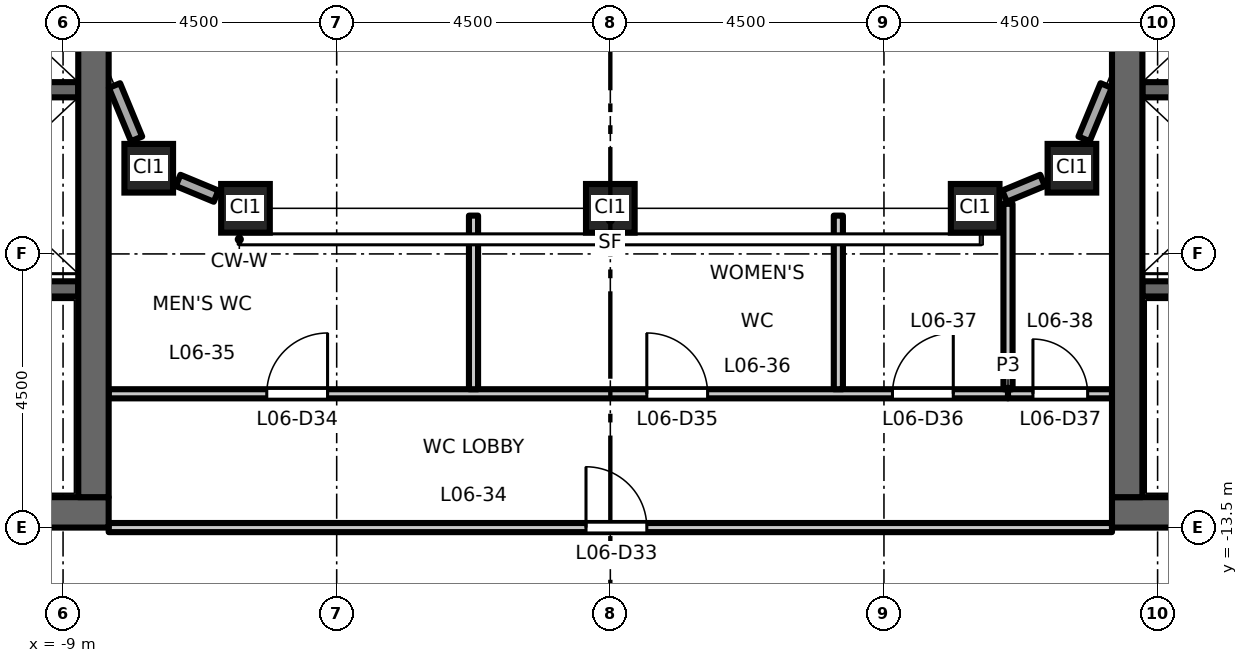
"""IFC4 building model, lengths in metres.
Left out: names, types, materials, properties, quantities, classifications, styles, units other than length and angle.
Written with IfcOpenShell. Run it as: python <this file> out.ifc"""

import sys

from ifc_helpers import new_model, si_unit, direction, frame, frame_2d, origin, origin_2d, place, context, subcontext, project, spatial, rectangle, hollow_rectangle, extrude, element, fill, save


model = new_model("IFC4")
c1 = context("Model", 3, precision=1e-05, world=origin(), true_north=direction((0.0, 1.0)))
c2 = subcontext(c1, "Body", "Model", "MODEL_VIEW")
j1 = project(units=[si_unit("LENGTHUNIT", "METRE"), si_unit("PLANEANGLEUNIT", "RADIAN")], contexts=[c1])
p1 = place(None, origin())
s1 = spatial("IfcSite", under=j1, at=p1, CompositionType="ELEMENT")
p2 = place(p1, origin())
s2 = spatial("IfcBuilding", under=s1, at=p2, CompositionType="ELEMENT")
p3 = place(p2, frame((0.0, 0.0, 31.2)))
s3 = spatial("IfcBuildingStorey", under=s2, at=p3, CompositionType="ELEMENT", Elevation=31.2)
for number, where, z_axis, x_axis in (
    (1, (-7.591, -7.591, 0.0), (0.0, 0.0, 1.0), (1.0, 0.0, 0.0)),
    (2, (-6.0, -8.25, 0.0), (0.0, 0.0, 1.0), (1.0, 0.0, 0.0)),
    (3, (0.0, -8.25, 0.0), (0.0, 0.0, 1.0), (1.0, 0.0, 0.0)),
    (4, (6.0, -8.25, 0.0), (0.0, 0.0, 1.0), (1.0, 0.0, 0.0)),
    (5, (7.591, -7.591, 0.0), (0.0, 0.0, 1.0), (1.0, 0.0, 0.0)),
):
    element("IfcColumn", number, at=place(p3, frame(where, z_axis=z_axis, x_axis=x_axis)), inside=s3, PredefinedType="COLUMN", context=c2, shape_type="SweptSolid", body=[
        extrude(hollow_rectangle(XDim=0.8, YDim=0.8, WallThickness=0.05, at=origin_2d()), origin(), (0.0, 0.0, 1.0), 4.5),
    ])
p4 = place(p3, frame((-8.75, -6.3, 0.0), z_axis=(0.0, 0.0, 1.0), x_axis=(-1.0, 0.0, 0.0)))
e6 = element("IfcWall", 6, at=p4, inside=s3, PredefinedType="SHEAR", context=c2, shape_type="SweptSolid", body=[
    extrude(rectangle(XDim=3.1, YDim=0.25, at=frame_2d((1.55, 0.0))), origin(), (0.0, 0.0, 1.0), 4.35),
])
p5 = place(p3, frame((-8.75, -9.575, 0.0), z_axis=(0.0, 0.0, 1.0), x_axis=(-1.0, 0.0, 0.0)))
e7 = element("IfcWall", 7, at=p5, inside=s3, PredefinedType="SHEAR", context=c2, shape_type="SweptSolid", body=[
    extrude(rectangle(XDim=8.0, YDim=0.25, at=frame_2d((4.0, 0.0))), origin(), (0.0, 0.0, 1.0), 4.35),
])
p6 = place(p5, frame((6.65, 0.0, 0.0)))
e8 = element("IfcOpeningElement", 8, at=p6, cuts=e7, PredefinedType="OPENING", context=c2, shape_type="SweptSolid", body=[
    extrude(rectangle(XDim=1.1, YDim=2.1, at=frame_2d((0.55, 1.05))), frame((0.0, 0.135, 0.0), z_axis=(0.0, -1.0, 0.0), x_axis=(1.0, 0.0, 0.0)), (0.0, 0.0, 1.0), 0.27),
])
p7 = place(p3, frame((-8.25, -13.25, 0.0), z_axis=(0.0, 0.0, 1.0), x_axis=(-1.0, 0.0, 0.0)))
e9 = element("IfcWall", 9, at=p7, inside=s3, PredefinedType="SHEAR", context=c2, shape_type="SweptSolid", body=[
    extrude(rectangle(XDim=13.5, YDim=0.5, at=frame_2d((6.75, 0.0))), origin(), (0.0, 0.0, 1.0), 4.35),
])
p8 = place(p3, frame((-8.5, -13.0, 0.0), z_axis=(0.0, 0.0, 1.0), x_axis=(0.0, 1.0, 0.0)))
e10 = element("IfcWall", 10, at=p8, inside=s3, PredefinedType="SHEAR", context=c2, shape_type="SweptSolid", body=[
    extrude(rectangle(XDim=26.0, YDim=0.5, at=frame_2d((13.0, 0.0))), origin(), (0.0, 0.0, 1.0), 4.35),
])
p9 = place(p3, frame((8.75, -6.3, 0.0), z_axis=(0.0, 0.0, 1.0), x_axis=(1.0, 0.0, 0.0)))
e11 = element("IfcWall", 11, at=p9, inside=s3, PredefinedType="SHEAR", context=c2, shape_type="SweptSolid", body=[
    extrude(rectangle(XDim=3.1, YDim=0.25, at=frame_2d((1.55, 0.0))), origin(), (0.0, 0.0, 1.0), 4.35),
])
p10 = place(p3, frame((8.75, -9.575, 0.0), z_axis=(0.0, 0.0, 1.0), x_axis=(1.0, 0.0, 0.0)))
e12 = element("IfcWall", 12, at=p10, inside=s3, PredefinedType="SHEAR", context=c2, shape_type="SweptSolid", body=[
    extrude(rectangle(XDim=8.0, YDim=0.25, at=frame_2d((4.0, 0.0))), origin(), (0.0, 0.0, 1.0), 4.35),
])
p11 = place(p10, frame((6.65, 0.0, 0.0)))
e13 = element("IfcOpeningElement", 13, at=p11, cuts=e12, PredefinedType="OPENING", context=c2, shape_type="SweptSolid", body=[
    extrude(rectangle(XDim=1.1, YDim=2.1, at=frame_2d((0.55, 1.05))), frame((0.0, 0.135, 0.0), z_axis=(0.0, -1.0, 0.0), x_axis=(1.0, 0.0, 0.0)), (0.0, 0.0, 1.0), 0.27),
])
p12 = place(p3, frame((8.25, -13.25, 0.0), z_axis=(0.0, 0.0, 1.0), x_axis=(1.0, 0.0, 0.0)))
e14 = element("IfcWall", 14, at=p12, inside=s3, PredefinedType="SHEAR", context=c2, shape_type="SweptSolid", body=[
    extrude(rectangle(XDim=13.5, YDim=0.5, at=frame_2d((6.75, 0.0))), origin(), (0.0, 0.0, 1.0), 4.35),
])
p13 = place(p3, frame((8.5, -13.0, 0.0), z_axis=(0.0, 0.0, 1.0), x_axis=(0.0, 1.0, 0.0)))
e15 = element("IfcWall", 15, at=p13, inside=s3, PredefinedType="SHEAR", context=c2, shape_type="SweptSolid", body=[
    extrude(rectangle(XDim=26.0, YDim=0.5, at=frame_2d((13.0, 0.0))), origin(), (0.0, 0.0, 1.0), 4.35),
])
p14 = place(p3, frame((6.483, -8.05, 0.0), z_axis=(0.0, 0.0, 1.0), x_axis=(0.923854141361, 0.382744726273, 0.0)))
e16 = element("IfcWall", 16, at=p14, inside=s3, PredefinedType="STANDARD", context=c2, shape_type="SweptSolid", body=[
    extrude(rectangle(XDim=0.677, YDim=0.2, at=frame_2d((0.338, 0.0))), origin(), (0.0, 0.0, 1.0), 3.73),
])
for number, where, z_axis, x_axis in (
    (17, (7.791, -7.108, 0.0), (0.0, 0.0, 1.0), (0.383, 0.924, 0.0)),
    (18, (-8.154, -6.231, 0.0), (0.0, 0.0, 1.0), (0.383, -0.924, 0.0)),
):
    element("IfcWall", number, at=place(p3, frame(where, z_axis=z_axis, x_axis=x_axis)), inside=s3, PredefinedType="STANDARD", context=c2, shape_type="SweptSolid", body=[
        extrude(rectangle(XDim=0.949, YDim=0.2, at=frame_2d((0.475, 0.0))), origin(), (0.0, 0.0, 1.0), 3.73),
    ])
p15 = place(p3, frame((-7.108, -7.791, 0.0), z_axis=(0.0, 0.0, 1.0), x_axis=(0.923854141361, -0.382744726273, 0.0)))
e19 = element("IfcWall", 19, at=p15, inside=s3, PredefinedType="STANDARD", context=c2, shape_type="SweptSolid", body=[
    extrude(rectangle(XDim=0.677, YDim=0.2, at=frame_2d((0.338, 0.0))), origin(), (0.0, 0.0, 1.0), 3.73),
])
p16 = place(p3, frame((-8.25, -13.5, 0.0), z_axis=(0.0, 0.0, 1.0), x_axis=(1.0, 0.0, 0.0)))
e20 = element("IfcWall", 20, at=p16, inside=s3, PredefinedType="PARTITIONING", context=c2, shape_type="SweptSolid", body=[
    extrude(rectangle(XDim=16.5, YDim=0.15, at=frame_2d((8.25, 0.0))), origin(), (0.0, 0.0, 1.0), 3.85),
])
p17 = place(p16, frame((7.85, 0.0, 0.0)))
e21 = element("IfcOpeningElement", 21, at=p17, cuts=e20, PredefinedType="OPENING", context=c2, shape_type="SweptSolid", body=[
    extrude(rectangle(XDim=1.0, YDim=2.1, at=frame_2d((0.5, 1.05))), frame((0.0, 0.085, 0.0), z_axis=(0.0, -1.0, 0.0), x_axis=(1.0, 0.0, 0.0)), (0.0, 0.0, 1.0), 0.17),
])
p18 = place(p3, frame((-8.25, -11.3, 0.0), z_axis=(0.0, 0.0, 1.0), x_axis=(1.0, 0.0, 0.0)))
e22 = element("IfcWall", 22, at=p18, inside=s3, PredefinedType="PARTITIONING", context=c2, shape_type="SweptSolid", body=[
    extrude(rectangle(XDim=14.79, YDim=0.15, at=frame_2d((7.395, 0.0))), origin(), (0.0, 0.0, 1.0), 4.35),
])
p19 = place(p18, frame((2.6, 0.0, 0.0)))
e23 = element("IfcOpeningElement", 23, at=p19, cuts=e22, PredefinedType="OPENING", context=c2, shape_type="SweptSolid", body=[
    extrude(rectangle(XDim=1.0, YDim=2.1, at=frame_2d((0.5, 1.05))), frame((0.0, 0.085, 0.0), z_axis=(0.0, -1.0, 0.0), x_axis=(1.0, 0.0, 0.0)), (0.0, 0.0, 1.0), 0.17),
])
p20 = place(p18, frame((8.85, 0.0, 0.0)))
e24 = element("IfcOpeningElement", 24, at=p20, cuts=e22, PredefinedType="OPENING", context=c2, shape_type="SweptSolid", body=[
    extrude(rectangle(XDim=1.0, YDim=2.1, at=frame_2d((0.5, 1.05))), frame((0.0, 0.085, 0.0), z_axis=(0.0, -1.0, 0.0), x_axis=(1.0, 0.0, 0.0)), (0.0, 0.0, 1.0), 0.17),
])
p21 = place(p18, frame((12.89, 0.0, 0.0)))
e25 = element("IfcOpeningElement", 25, at=p21, cuts=e22, PredefinedType="OPENING", context=c2, shape_type="SweptSolid", body=[
    extrude(rectangle(XDim=1.0, YDim=2.1, at=frame_2d((0.5, 1.05))), frame((0.0, 0.085, 0.0), z_axis=(0.0, -1.0, 0.0), x_axis=(1.0, 0.0, 0.0)), (0.0, 0.0, 1.0), 0.17),
])
p22 = place(p3, frame((6.54, -11.3, 0.0), z_axis=(0.0, 0.0, 1.0), x_axis=(1.0, 0.0, 0.0)))
e26 = element("IfcWall", 26, at=p22, inside=s3, PredefinedType="PARTITIONING", context=c2, shape_type="SweptSolid", body=[
    extrude(rectangle(XDim=1.71, YDim=0.15, at=frame_2d((0.855, 0.0))), origin(), (0.0, 0.0, 1.0), 4.35),
])
p23 = place(p22, frame((0.41, 0.0, 0.0)))
e27 = element("IfcOpeningElement", 27, at=p23, cuts=e26, PredefinedType="OPENING", context=c2, shape_type="SweptSolid", body=[
    extrude(rectangle(XDim=0.9, YDim=2.1, at=frame_2d((0.45, 1.05))), frame((0.0, 0.085, 0.0), z_axis=(0.0, -1.0, 0.0), x_axis=(1.0, 0.0, 0.0)), (0.0, 0.0, 1.0), 0.17),
])
for number, where, z_axis, x_axis in (
    (28, (-2.25, -11.225, 0.0), (0.0, 0.0, 1.0), (0.0, 1.0, 0.0)),
    (29, (3.75, -11.225, 0.0), (0.0, 0.0, 1.0), (0.0, 1.0, 0.0)),
):
    element("IfcWall", number, at=place(p3, frame(where, z_axis=z_axis, x_axis=x_axis)), inside=s3, PredefinedType="PARTITIONING", context=c2, shape_type="SweptSolid", body=[
        extrude(rectangle(XDim=2.855, YDim=0.15, at=frame_2d((1.427, 0.0))), origin(), (0.0, 0.0, 1.0), 4.35),
    ])
p24 = place(p3, frame((6.54, -11.225, 0.0), z_axis=(0.0, 0.0, 1.0), x_axis=(0.0, 1.0, 0.0)))
e30 = element("IfcWall", 30, at=p24, inside=s3, PredefinedType="PARTITIONING", context=c2, shape_type="SweptSolid", body=[
    extrude(rectangle(XDim=3.049, YDim=0.15, at=frame_2d((1.524, 0.0))), origin(), (0.0, 0.0, 1.0), 4.35),
])
p25 = place(p17, origin())
e31 = element("IfcDoor", 31, at=p25, inside=s3, OperationType="SINGLE_SWING_LEFT", PredefinedType="DOOR", context=c2, shape_type="SweptSolid", body=[
    extrude(rectangle(XDim=1.0, YDim=2.1, at=frame_2d((0.5, 1.05))), frame((0.0, 0.025, 0.0), z_axis=(0.0, -1.0, 0.0), x_axis=(1.0, 0.0, 0.0)), (0.0, 0.0, 1.0), 0.05),
])
fill(e21, e31)
p26 = place(p19, origin())
e32 = element("IfcDoor", 32, at=p26, inside=s3, OperationType="SINGLE_SWING_RIGHT", PredefinedType="DOOR", context=c2, shape_type="SweptSolid", body=[
    extrude(rectangle(XDim=1.0, YDim=2.1, at=frame_2d((0.5, 1.05))), frame((0.0, 0.025, 0.0), z_axis=(0.0, -1.0, 0.0), x_axis=(1.0, 0.0, 0.0)), (0.0, 0.0, 1.0), 0.05),
])
fill(e23, e32)
p27 = place(p20, origin())
e33 = element("IfcDoor", 33, at=p27, inside=s3, OperationType="SINGLE_SWING_LEFT", PredefinedType="DOOR", context=c2, shape_type="SweptSolid", body=[
    extrude(rectangle(XDim=1.0, YDim=2.1, at=frame_2d((0.5, 1.05))), frame((0.0, 0.025, 0.0), z_axis=(0.0, -1.0, 0.0), x_axis=(1.0, 0.0, 0.0)), (0.0, 0.0, 1.0), 0.05),
])
fill(e24, e33)
p28 = place(p21, origin())
e34 = element("IfcDoor", 34, at=p28, inside=s3, OperationType="SINGLE_SWING_RIGHT", PredefinedType="DOOR", context=c2, shape_type="SweptSolid", body=[
    extrude(rectangle(XDim=1.0, YDim=2.1, at=frame_2d((0.5, 1.05))), frame((0.0, 0.025, 0.0), z_axis=(0.0, -1.0, 0.0), x_axis=(1.0, 0.0, 0.0)), (0.0, 0.0, 1.0), 0.05),
])
fill(e25, e34)
p29 = place(p23, origin())
e35 = element("IfcDoor", 35, at=p29, inside=s3, OperationType="SINGLE_SWING_LEFT", PredefinedType="DOOR", context=c2, shape_type="SweptSolid", body=[
    extrude(rectangle(XDim=0.9, YDim=2.1, at=frame_2d((0.45, 1.05))), frame((0.0, 0.025, 0.0), z_axis=(0.0, -1.0, 0.0), x_axis=(1.0, 0.0, 0.0)), (0.0, 0.0, 1.0), 0.05),
])
fill(e27, e35)
save(model, sys.argv[1])
